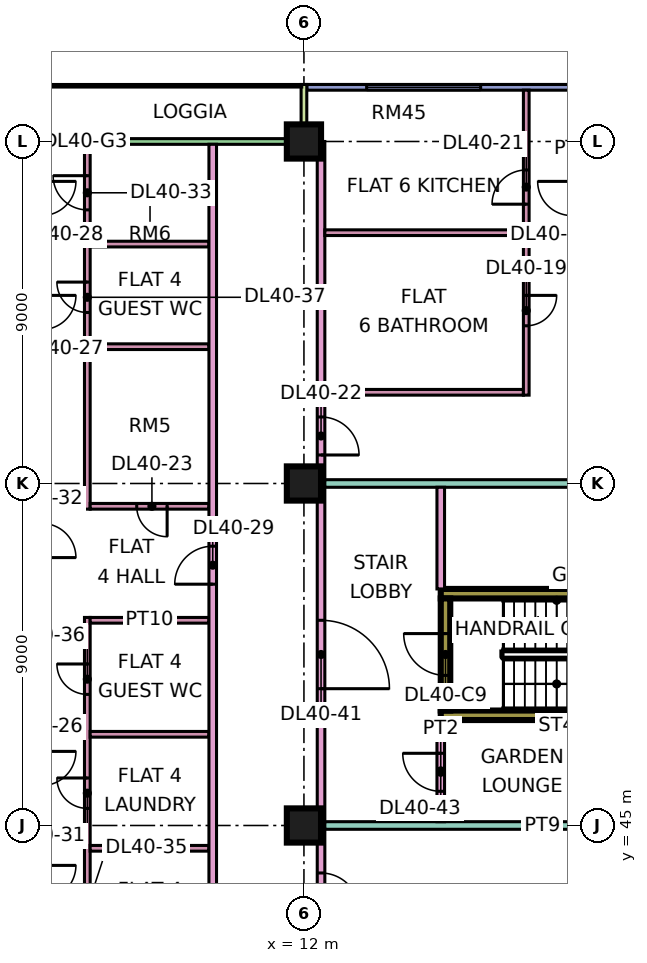
"""IFC4 building model, lengths in metres.
Left out: names, types, materials, properties, quantities, classifications, styles, units other than length and angle.
Written with IfcOpenShell. Run it as: python <this file> out.ifc"""

import sys

from ifc_helpers import new_model, si_unit, direction, frame, frame_2d, origin, origin_2d, place, context, subcontext, project, spatial, rectangle, extrude, element, fill, save


model = new_model("IFC4")
c1 = context("Model", 3, precision=1e-05, world=origin(), true_north=direction((0.0, 1.0)))
c2 = subcontext(c1, "Body", "Model", "MODEL_VIEW")
j1 = project(units=[si_unit("LENGTHUNIT", "METRE"), si_unit("PLANEANGLEUNIT", "RADIAN")], contexts=[c1])
p1 = place(None, origin())
s1 = spatial("IfcSite", under=j1, at=p1, CompositionType="ELEMENT")
p2 = place(p1, origin())
s2 = spatial("IfcBuilding", under=s1, at=p2, CompositionType="ELEMENT")
p3 = place(p2, frame((0.0, 0.0, 176.15)))
s3 = spatial("IfcBuildingStorey", under=s2, at=p3, CompositionType="ELEMENT", Elevation=176.15)
for number, where, z_axis, x_axis in (
    (1, (12.0, 45.0, 0.0), (0.0, 0.0, 1.0), (1.0, 0.0, 0.0)),
    (2, (12.0, 54.0, 0.0), (0.0, 0.0, 1.0), (1.0, 0.0, 0.0)),
    (3, (12.0, 63.0, 0.0), (0.0, 0.0, 1.0), (1.0, 0.0, 0.0)),
):
    element("IfcColumn", number, at=place(p3, frame(where, z_axis=z_axis, x_axis=x_axis)), inside=s3, PredefinedType="COLUMN", context=c2, shape_type="SweptSolid", body=[
        extrude(rectangle(XDim=0.9, YDim=0.9, at=origin_2d()), origin(), (0.0, 0.0, 1.0), 3.75),
    ])
for number, where, z_axis, x_axis in (
    (4, (15.6, 47.9, 0.0), (0.0, 0.0, 1.0), (1.0, 0.0, 0.0)),
    (5, (15.6, 51.1, 0.0), (0.0, 0.0, 1.0), (1.0, 0.0, 0.0)),
):
    element("IfcWall", number, at=place(p3, frame(where, z_axis=z_axis, x_axis=x_axis)), inside=s3, PredefinedType="SHEAR", context=c2, shape_type="SweptSolid", body=[
        extrude(rectangle(XDim=7.0, YDim=0.25, at=frame_2d((3.5, 0.0))), origin(), (0.0, 0.0, 1.0), 3.75),
    ])
p4 = place(p3, frame((15.725, 48.025, 0.0), z_axis=(0.0, 0.0, 1.0), x_axis=(0.0, 1.0, 0.0)))
e6 = element("IfcWall", 6, at=p4, inside=s3, PredefinedType="SHEAR", context=c2, shape_type="SweptSolid", body=[
    extrude(rectangle(XDim=2.95, YDim=0.25, at=frame_2d((1.475, 0.0))), origin(), (0.0, 0.0, 1.0), 3.75),
])
p5 = place(p4, frame((0.925, 0.0, 0.0)))
e7 = element("IfcOpeningElement", 7, at=p5, cuts=e6, PredefinedType="OPENING", context=c2, shape_type="SweptSolid", body=[
    extrude(rectangle(XDim=1.1, YDim=2.2, at=frame_2d((0.55, 1.1))), frame((0.0, 0.135, 0.0), z_axis=(0.0, -1.0, 0.0), x_axis=(1.0, 0.0, 0.0)), (0.0, 0.0, 1.0), 0.27),
])
p6 = place(p3, frame((22.5, 64.425, 0.0), z_axis=(0.0, 0.0, 1.0), x_axis=(-1.0, 0.0, 0.0)))
e8 = element("IfcWall", 8, at=p6, inside=s3, PredefinedType="SOLIDWALL", context=c2, shape_type="SweptSolid", body=[
    extrude(rectangle(XDim=10.425, YDim=0.15, at=frame_2d((5.212, 0.0))), origin(), (0.0, 0.0, 1.0), 3.35),
])
p7 = place(p6, frame((0.525, 0.0, 0.45)))
e9 = element("IfcOpeningElement", 9, at=p7, cuts=e8, PredefinedType="OPENING", context=c2, shape_type="SweptSolid", body=[
    extrude(rectangle(XDim=2.4, YDim=2.4, at=frame_2d((1.2, 1.2))), frame((0.0, 0.085, 0.0), z_axis=(0.0, -1.0, 0.0), x_axis=(1.0, 0.0, 0.0)), (0.0, 0.0, 1.0), 0.17),
])
p8 = place(p6, frame((5.85, 0.0, 0.45)))
e10 = element("IfcOpeningElement", 10, at=p8, cuts=e8, PredefinedType="OPENING", context=c2, shape_type="SweptSolid", body=[
    extrude(rectangle(XDim=3.0, YDim=2.4, at=frame_2d((1.5, 1.2))), frame((0.0, 0.085, 0.0), z_axis=(0.0, -1.0, 0.0), x_axis=(1.0, 0.0, 0.0)), (0.0, 0.0, 1.0), 0.17),
])
p9 = place(p3, frame((11.925, 63.0, 0.0), z_axis=(0.0, 0.0, 1.0), x_axis=(-1.0, 0.0, 0.0)))
e11 = element("IfcWall", 11, at=p9, inside=s3, PredefinedType="SOLIDWALL", context=c2, shape_type="SweptSolid", body=[
    extrude(rectangle(XDim=10.35, YDim=0.15, at=frame_2d((5.175, 0.0))), origin(), (0.0, 0.0, 1.0), 3.35),
])
p10 = place(p9, frame((7.688, 0.0, 0.0)))
e12 = element("IfcOpeningElement", 12, at=p10, cuts=e11, PredefinedType="OPENING", context=c2, shape_type="SweptSolid", body=[
    extrude(rectangle(XDim=1.8, YDim=2.4, at=frame_2d((0.9, 1.2))), frame((0.0, 0.085, 0.0), z_axis=(0.0, -1.0, 0.0), x_axis=(1.0, 0.0, 0.0)), (0.0, 0.0, 1.0), 0.17),
])
p11 = place(p3, frame((12.0, 64.5, 0.0), z_axis=(0.0, 0.0, 1.0), x_axis=(0.0, -1.0, 0.0)))
e13 = element("IfcWall", 13, at=p11, inside=s3, PredefinedType="SOLIDWALL", context=c2, shape_type="SweptSolid", body=[
    extrude(rectangle(XDim=1.5, YDim=0.15, at=frame_2d((0.75, 0.0))), origin(), (0.0, 0.0, 1.0), 3.35),
])
p12 = place(p3, frame((6.3, 36.1, 0.0), z_axis=(0.0, 0.0, 1.0), x_axis=(0.0, 1.0, 0.0)))
e14 = element("IfcWall", 14, at=p12, inside=s3, PredefinedType="PARTITIONING", context=c2, shape_type="SweptSolid", body=[
    extrude(rectangle(XDim=14.375, YDim=0.15, at=frame_2d((7.188, 0.0))), origin(), (0.0, 0.0, 1.0), 3.35),
])
p13 = place(p12, frame((2.15, 0.0, 0.0)))
e15 = element("IfcOpeningElement", 15, at=p13, cuts=e14, PredefinedType="OPENING", context=c2, shape_type="SweptSolid", body=[
    extrude(rectangle(XDim=0.9, YDim=2.1, at=frame_2d((0.45, 1.05))), frame((0.0, 0.085, 0.0), z_axis=(0.0, -1.0, 0.0), x_axis=(1.0, 0.0, 0.0)), (0.0, 0.0, 1.0), 0.17),
])
p14 = place(p12, frame((9.35, 0.0, 0.0)))
e16 = element("IfcOpeningElement", 16, at=p14, cuts=e14, PredefinedType="OPENING", context=c2, shape_type="SweptSolid", body=[
    extrude(rectangle(XDim=0.8, YDim=2.1, at=frame_2d((0.4, 1.05))), frame((0.0, 0.085, 0.0), z_axis=(0.0, -1.0, 0.0), x_axis=(1.0, 0.0, 0.0)), (0.0, 0.0, 1.0), 0.17),
])
p15 = place(p12, frame((6.35, 0.0, 0.0)))
e17 = element("IfcOpeningElement", 17, at=p15, cuts=e14, PredefinedType="OPENING", context=c2, shape_type="SweptSolid", body=[
    extrude(rectangle(XDim=0.8, YDim=2.1, at=frame_2d((0.4, 1.05))), frame((0.0, 0.085, 0.0), z_axis=(0.0, -1.0, 0.0), x_axis=(1.0, 0.0, 0.0)), (0.0, 0.0, 1.0), 0.17),
])
p16 = place(p12, frame((12.35, 0.0, 0.0)))
e18 = element("IfcOpeningElement", 18, at=p16, cuts=e14, PredefinedType="OPENING", context=c2, shape_type="SweptSolid", body=[
    extrude(rectangle(XDim=0.8, YDim=2.1, at=frame_2d((0.4, 1.05))), frame((0.0, 0.085, 0.0), z_axis=(0.0, -1.0, 0.0), x_axis=(1.0, 0.0, 0.0)), (0.0, 0.0, 1.0), 0.17),
])
p17 = place(p3, frame((6.3, 53.325, 0.0), z_axis=(0.0, 0.0, 1.0), x_axis=(0.0, 1.0, 0.0)))
e19 = element("IfcWall", 19, at=p17, inside=s3, PredefinedType="PARTITIONING", context=c2, shape_type="SweptSolid", body=[
    extrude(rectangle(XDim=9.601, YDim=0.15, at=frame_2d((4.801, 0.0))), origin(), (0.0, 0.0, 1.0), 3.35),
])
p18 = place(p17, frame((7.875, 0.0, 0.0)))
e20 = element("IfcOpeningElement", 20, at=p18, cuts=e19, PredefinedType="OPENING", context=c2, shape_type="SweptSolid", body=[
    extrude(rectangle(XDim=0.9, YDim=2.1, at=frame_2d((0.45, 1.05))), frame((0.0, 0.085, 0.0), z_axis=(0.0, -1.0, 0.0), x_axis=(1.0, 0.0, 0.0)), (0.0, 0.0, 1.0), 0.17),
])
p19 = place(p17, frame((5.175, 0.0, 0.0)))
e21 = element("IfcOpeningElement", 21, at=p19, cuts=e19, PredefinedType="OPENING", context=c2, shape_type="SweptSolid", body=[
    extrude(rectangle(XDim=0.8, YDim=2.1, at=frame_2d((0.4, 1.05))), frame((0.0, 0.085, 0.0), z_axis=(0.0, -1.0, 0.0), x_axis=(1.0, 0.0, 0.0)), (0.0, 0.0, 1.0), 0.17),
])
for number, where, z_axis, x_axis in (
    (22, (6.375, 44.4, 0.0), (0.0, 0.0, 1.0), (1.0, 0.0, 0.0)),
    (23, (6.375, 47.4, 0.0), (0.0, 0.0, 1.0), (1.0, 0.0, 0.0)),
    (24, (6.375, 50.4, 0.0), (0.0, 0.0, 1.0), (1.0, 0.0, 0.0)),
):
    element("IfcWall", number, at=place(p3, frame(where, z_axis=z_axis, x_axis=x_axis)), inside=s3, PredefinedType="PARTITIONING", context=c2, shape_type="SweptSolid", body=[
        extrude(rectangle(XDim=3.125, YDim=0.15, at=frame_2d((1.562, 0.0))), origin(), (0.0, 0.0, 1.0), 3.35),
    ])
p20 = place(p3, frame((6.375, 53.4, 0.0), z_axis=(0.0, 0.0, 1.0), x_axis=(1.0, 0.0, 0.0)))
e25 = element("IfcWall", 25, at=p20, inside=s3, PredefinedType="PARTITIONING", context=c2, shape_type="SweptSolid", body=[
    extrude(rectangle(XDim=3.125, YDim=0.15, at=frame_2d((1.562, 0.0))), origin(), (0.0, 0.0, 1.0), 3.35),
])
p21 = place(p20, frame((1.225, 0.0, 0.0)))
e26 = element("IfcOpeningElement", 26, at=p21, cuts=e25, PredefinedType="OPENING", context=c2, shape_type="SweptSolid", body=[
    extrude(rectangle(XDim=0.8, YDim=2.1, at=frame_2d((0.4, 1.05))), frame((0.0, 0.085, 0.0), z_axis=(0.0, -1.0, 0.0), x_axis=(1.0, 0.0, 0.0)), (0.0, 0.0, 1.0), 0.17),
])
for number, where, z_axis, x_axis in (
    (27, (6.375, 57.6, 0.0), (0.0, 0.0, 1.0), (1.0, 0.0, 0.0)),
    (28, (6.375, 60.3, 0.0), (0.0, 0.0, 1.0), (1.0, 0.0, 0.0)),
):
    element("IfcWall", number, at=place(p3, frame(where, z_axis=z_axis, x_axis=x_axis)), inside=s3, PredefinedType="PARTITIONING", context=c2, shape_type="SweptSolid", body=[
        extrude(rectangle(XDim=3.125, YDim=0.15, at=frame_2d((1.562, 0.0))), origin(), (0.0, 0.0, 1.0), 3.35),
    ])
p22 = place(p3, frame((9.6, 20.0, 0.0), z_axis=(0.0, 0.0, 1.0), x_axis=(0.0, 1.0, 0.0)))
e29 = element("IfcWall", 29, at=p22, inside=s3, PredefinedType="PARTITIONING", context=c2, shape_type="SweptSolid", body=[
    extrude(rectangle(XDim=42.926, YDim=0.2, at=frame_2d((21.463, 0.0))), origin(), (0.0, 0.0, 1.0), 3.35),
])
p23 = place(p22, frame((31.35, 0.0, 0.0)))
e30 = element("IfcOpeningElement", 30, at=p23, cuts=e29, PredefinedType="OPENING", context=c2, shape_type="SweptSolid", body=[
    extrude(rectangle(XDim=1.0, YDim=2.1, at=frame_2d((0.5, 1.05))), frame((0.0, 0.11, 0.0), z_axis=(0.0, -1.0, 0.0), x_axis=(1.0, 0.0, 0.0)), (0.0, 0.0, 1.0), 0.22),
])
p24 = place(p22, frame((0.6, 0.0, 0.0)))
e31 = element("IfcOpeningElement", 31, at=p24, cuts=e29, PredefinedType="OPENING", context=c2, shape_type="SweptSolid", body=[
    extrude(rectangle(XDim=1.2, YDim=2.1, at=frame_2d((0.6, 1.05))), frame((0.0, 0.11, 0.0), z_axis=(0.0, -1.0, 0.0), x_axis=(1.0, 0.0, 0.0)), (0.0, 0.0, 1.0), 0.22),
])
p25 = place(p22, frame((3.9, 0.0, 0.0)))
e32 = element("IfcOpeningElement", 32, at=p25, cuts=e29, PredefinedType="OPENING", context=c2, shape_type="SweptSolid", body=[
    extrude(rectangle(XDim=1.0, YDim=2.1, at=frame_2d((0.5, 1.05))), frame((0.0, 0.11, 0.0), z_axis=(0.0, -1.0, 0.0), x_axis=(1.0, 0.0, 0.0)), (0.0, 0.0, 1.0), 0.22),
])
p26 = place(p3, frame((12.45, 20.0, 0.0), z_axis=(0.0, 0.0, 1.0), x_axis=(0.0, 1.0, 0.0)))
e33 = element("IfcWall", 33, at=p26, inside=s3, PredefinedType="PARTITIONING", context=c2, shape_type="SweptSolid", body=[
    extrude(rectangle(XDim=43.0, YDim=0.2, at=frame_2d((21.5, 0.0))), origin(), (0.0, 0.0, 1.0), 3.35),
])
p27 = place(p26, frame((5.95, 0.0, 0.0)))
e34 = element("IfcOpeningElement", 34, at=p27, cuts=e33, PredefinedType="OPENING", context=c2, shape_type="SweptSolid", body=[
    extrude(rectangle(XDim=1.0, YDim=2.1, at=frame_2d((0.5, 1.05))), frame((0.0, 0.11, 0.0), z_axis=(0.0, -1.0, 0.0), x_axis=(1.0, 0.0, 0.0)), (0.0, 0.0, 1.0), 0.22),
])
p28 = place(p26, frame((12.0, 0.0, 0.0)))
e35 = element("IfcOpeningElement", 35, at=p28, cuts=e33, PredefinedType="OPENING", context=c2, shape_type="SweptSolid", body=[
    extrude(rectangle(XDim=1.0, YDim=2.1, at=frame_2d((0.5, 1.05))), frame((0.0, 0.11, 0.0), z_axis=(0.0, -1.0, 0.0), x_axis=(1.0, 0.0, 0.0)), (0.0, 0.0, 1.0), 0.22),
])
p29 = place(p26, frame((22.75, 0.0, 0.0)))
e36 = element("IfcOpeningElement", 36, at=p29, cuts=e33, PredefinedType="OPENING", context=c2, shape_type="SweptSolid", body=[
    extrude(rectangle(XDim=1.0, YDim=2.1, at=frame_2d((0.5, 1.05))), frame((0.0, 0.11, 0.0), z_axis=(0.0, -1.0, 0.0), x_axis=(1.0, 0.0, 0.0)), (0.0, 0.0, 1.0), 0.22),
])
p30 = place(p26, frame((34.75, 0.0, 0.0)))
e37 = element("IfcOpeningElement", 37, at=p30, cuts=e33, PredefinedType="OPENING", context=c2, shape_type="SweptSolid", body=[
    extrude(rectangle(XDim=1.0, YDim=2.1, at=frame_2d((0.5, 1.05))), frame((0.0, 0.11, 0.0), z_axis=(0.0, -1.0, 0.0), x_axis=(1.0, 0.0, 0.0)), (0.0, 0.0, 1.0), 0.22),
])
p31 = place(p26, frame((1.15, 0.0, 0.0)))
e38 = element("IfcOpeningElement", 38, at=p31, cuts=e33, PredefinedType="OPENING", context=c2, shape_type="SweptSolid", body=[
    extrude(rectangle(XDim=1.8, YDim=2.1, at=frame_2d((0.9, 1.05))), frame((0.0, 0.11, 0.0), z_axis=(0.0, -1.0, 0.0), x_axis=(1.0, 0.0, 0.0)), (0.0, 0.0, 1.0), 0.22),
])
p32 = place(p26, frame((28.6, 0.0, 0.0)))
e39 = element("IfcOpeningElement", 39, at=p32, cuts=e33, PredefinedType="OPENING", context=c2, shape_type="SweptSolid", body=[
    extrude(rectangle(XDim=1.8, YDim=2.1, at=frame_2d((0.9, 1.05))), frame((0.0, 0.11, 0.0), z_axis=(0.0, -1.0, 0.0), x_axis=(1.0, 0.0, 0.0)), (0.0, 0.0, 1.0), 0.22),
])
p33 = place(p3, frame((12.55, 45.0, 0.0), z_axis=(0.0, 0.0, 1.0), x_axis=(1.0, 0.0, 0.0)))
e40 = element("IfcWall", 40, at=p33, inside=s3, PredefinedType="PARTITIONING", context=c2, shape_type="SweptSolid", body=[
    extrude(rectangle(XDim=11.45, YDim=0.2, at=frame_2d((5.725, 0.0))), origin(), (0.0, 0.0, 1.0), 3.35),
])
p34 = place(p3, frame((12.55, 54.0, 0.0), z_axis=(0.0, 0.0, 1.0), x_axis=(1.0, 0.0, 0.0)))
e41 = element("IfcWall", 41, at=p34, inside=s3, PredefinedType="PARTITIONING", context=c2, shape_type="SweptSolid", body=[
    extrude(rectangle(XDim=11.376, YDim=0.2, at=frame_2d((5.688, 0.0))), origin(), (0.0, 0.0, 1.0), 3.35),
])
for number, where, z_axis, x_axis in (
    (42, (12.55, 56.4, 0.0), (0.0, 0.0, 1.0), (1.0, 0.0, 0.0)),
    (43, (12.55, 60.6, 0.0), (0.0, 0.0, 1.0), (1.0, 0.0, 0.0)),
):
    element("IfcWall", number, at=place(p3, frame(where, z_axis=z_axis, x_axis=x_axis)), inside=s3, PredefinedType="PARTITIONING", context=c2, shape_type="SweptSolid", body=[
        extrude(rectangle(XDim=5.225, YDim=0.15, at=frame_2d((2.612, 0.0))), origin(), (0.0, 0.0, 1.0), 3.35),
    ])
p35 = place(p3, frame((15.6, 45.1, 0.0), z_axis=(0.0, 0.0, 1.0), x_axis=(0.0, 1.0, 0.0)))
e44 = element("IfcWall", 44, at=p35, inside=s3, PredefinedType="PARTITIONING", context=c2, shape_type="SweptSolid", body=[
    extrude(rectangle(XDim=2.675, YDim=0.2, at=frame_2d((1.337, 0.0))), origin(), (0.0, 0.0, 1.0), 3.35),
])
p36 = place(p35, frame((0.8, 0.0, 0.0)))
e45 = element("IfcOpeningElement", 45, at=p36, cuts=e44, PredefinedType="OPENING", context=c2, shape_type="SweptSolid", body=[
    extrude(rectangle(XDim=1.0, YDim=2.1, at=frame_2d((0.5, 1.05))), frame((0.0, 0.11, 0.0), z_axis=(0.0, -1.0, 0.0), x_axis=(1.0, 0.0, 0.0)), (0.0, 0.0, 1.0), 0.22),
])
p37 = place(p3, frame((15.6, 51.225, 0.0), z_axis=(0.0, 0.0, 1.0), x_axis=(0.0, 1.0, 0.0)))
e46 = element("IfcWall", 46, at=p37, inside=s3, PredefinedType="PARTITIONING", context=c2, shape_type="SweptSolid", body=[
    extrude(rectangle(XDim=2.675, YDim=0.2, at=frame_2d((1.337, 0.0))), origin(), (0.0, 0.0, 1.0), 3.35),
])
p38 = place(p3, frame((17.85, 56.325, 0.0), z_axis=(0.0, 0.0, 1.0), x_axis=(0.0, 1.0, 0.0)))
e47 = element("IfcWall", 47, at=p38, inside=s3, PredefinedType="PARTITIONING", context=c2, shape_type="SweptSolid", body=[
    extrude(rectangle(XDim=8.025, YDim=0.15, at=frame_2d((4.013, 0.0))), origin(), (0.0, 0.0, 1.0), 3.35),
])
p39 = place(p38, frame((1.825, 0.0, 0.0)))
e48 = element("IfcOpeningElement", 48, at=p39, cuts=e47, PredefinedType="OPENING", context=c2, shape_type="SweptSolid", body=[
    extrude(rectangle(XDim=0.8, YDim=2.1, at=frame_2d((0.4, 1.05))), frame((0.0, 0.085, 0.0), z_axis=(0.0, -1.0, 0.0), x_axis=(1.0, 0.0, 0.0)), (0.0, 0.0, 1.0), 0.17),
])
p40 = place(p38, frame((5.025, 0.0, 0.0)))
e49 = element("IfcOpeningElement", 49, at=p40, cuts=e47, PredefinedType="OPENING", context=c2, shape_type="SweptSolid", body=[
    extrude(rectangle(XDim=0.9, YDim=2.1, at=frame_2d((0.45, 1.05))), frame((0.0, 0.085, 0.0), z_axis=(0.0, -1.0, 0.0), x_axis=(1.0, 0.0, 0.0)), (0.0, 0.0, 1.0), 0.17),
])
p41 = place(p8, origin())
e50 = element("IfcWindow", 50, at=p41, inside=s3, PartitioningType="SINGLE_PANEL", PredefinedType="WINDOW", context=c2, shape_type="SweptSolid", body=[
    extrude(rectangle(XDim=3.0, YDim=2.4, at=frame_2d((1.5, 1.2))), frame((0.0, 0.03, 0.0), z_axis=(0.0, -1.0, 0.0), x_axis=(1.0, 0.0, 0.0)), (0.0, 0.0, 1.0), 0.06),
])
fill(e10, e50)
p42 = place(p5, frame((1.1, 0.0, 0.0), z_axis=(0.0, 0.0, 1.0), x_axis=(-1.0, 0.0, 0.0)))
e51 = element("IfcDoor", 51, at=p42, inside=s3, OperationType="SINGLE_SWING_RIGHT", PredefinedType="DOOR", context=c2, shape_type="SweptSolid", body=[
    extrude(rectangle(XDim=1.1, YDim=2.2, at=frame_2d((0.55, 1.1))), frame((0.0, 0.025, 0.0), z_axis=(0.0, -1.0, 0.0), x_axis=(1.0, 0.0, 0.0)), (0.0, 0.0, 1.0), 0.05),
])
fill(e7, e51)
p43 = place(p29, frame((1.0, 0.0, 0.0), z_axis=(0.0, 0.0, 1.0), x_axis=(-1.0, 0.0, 0.0)))
e52 = element("IfcDoor", 52, at=p43, inside=s3, OperationType="SINGLE_SWING_LEFT", PredefinedType="DOOR", context=c2, shape_type="SweptSolid", body=[
    extrude(rectangle(XDim=1.0, YDim=2.1, at=frame_2d((0.5, 1.05))), frame((0.0, 0.025, 0.0), z_axis=(0.0, -1.0, 0.0), x_axis=(1.0, 0.0, 0.0)), (0.0, 0.0, 1.0), 0.05),
])
fill(e36, e52)
p44 = place(p39, origin())
e53 = element("IfcDoor", 53, at=p44, inside=s3, OperationType="SINGLE_SWING_RIGHT", PredefinedType="DOOR", context=c2, shape_type="SweptSolid", body=[
    extrude(rectangle(XDim=0.8, YDim=2.1, at=frame_2d((0.4, 1.05))), frame((0.0, 0.025, 0.0), z_axis=(0.0, -1.0, 0.0), x_axis=(1.0, 0.0, 0.0)), (0.0, 0.0, 1.0), 0.05),
])
fill(e48, e53)
p45 = place(p40, origin())
e54 = element("IfcDoor", 54, at=p45, inside=s3, OperationType="SINGLE_SWING_LEFT", PredefinedType="DOOR", context=c2, shape_type="SweptSolid", body=[
    extrude(rectangle(XDim=0.9, YDim=2.1, at=frame_2d((0.45, 1.05))), frame((0.0, 0.025, 0.0), z_axis=(0.0, -1.0, 0.0), x_axis=(1.0, 0.0, 0.0)), (0.0, 0.0, 1.0), 0.05),
])
fill(e49, e54)
p46 = place(p30, frame((1.0, 0.0, 0.0), z_axis=(0.0, 0.0, 1.0), x_axis=(-1.0, 0.0, 0.0)))
e55 = element("IfcDoor", 55, at=p46, inside=s3, OperationType="SINGLE_SWING_LEFT", PredefinedType="DOOR", context=c2, shape_type="SweptSolid", body=[
    extrude(rectangle(XDim=1.0, YDim=2.1, at=frame_2d((0.5, 1.05))), frame((0.0, 0.025, 0.0), z_axis=(0.0, -1.0, 0.0), x_axis=(1.0, 0.0, 0.0)), (0.0, 0.0, 1.0), 0.05),
])
fill(e37, e55)
p47 = place(p21, origin())
e56 = element("IfcDoor", 56, at=p47, inside=s3, OperationType="SINGLE_SWING_RIGHT", PredefinedType="DOOR", context=c2, shape_type="SweptSolid", body=[
    extrude(rectangle(XDim=0.8, YDim=2.1, at=frame_2d((0.4, 1.05))), frame((0.0, 0.025, 0.0), z_axis=(0.0, -1.0, 0.0), x_axis=(1.0, 0.0, 0.0)), (0.0, 0.0, 1.0), 0.05),
])
fill(e26, e56)
p48 = place(p23, origin())
e57 = element("IfcDoor", 57, at=p48, inside=s3, OperationType="SINGLE_SWING_LEFT", PredefinedType="DOOR", context=c2, shape_type="SweptSolid", body=[
    extrude(rectangle(XDim=1.0, YDim=2.1, at=frame_2d((0.5, 1.05))), frame((0.0, 0.025, 0.0), z_axis=(0.0, -1.0, 0.0), x_axis=(1.0, 0.0, 0.0)), (0.0, 0.0, 1.0), 0.05),
])
fill(e30, e57)
p49 = place(p14, frame((0.8, 0.0, 0.0), z_axis=(0.0, 0.0, 1.0), x_axis=(-1.0, 0.0, 0.0)))
e58 = element("IfcDoor", 58, at=p49, inside=s3, OperationType="SINGLE_SWING_RIGHT", PredefinedType="DOOR", context=c2, shape_type="SweptSolid", body=[
    extrude(rectangle(XDim=0.8, YDim=2.1, at=frame_2d((0.4, 1.05))), frame((0.0, 0.025, 0.0), z_axis=(0.0, -1.0, 0.0), x_axis=(1.0, 0.0, 0.0)), (0.0, 0.0, 1.0), 0.05),
])
fill(e16, e58)
p50 = place(p18, frame((0.9, 0.0, 0.0), z_axis=(0.0, 0.0, 1.0), x_axis=(-1.0, 0.0, 0.0)))
e59 = element("IfcDoor", 59, at=p50, inside=s3, OperationType="SINGLE_SWING_RIGHT", PredefinedType="DOOR", context=c2, shape_type="SweptSolid", body=[
    extrude(rectangle(XDim=0.9, YDim=2.1, at=frame_2d((0.45, 1.05))), frame((0.0, 0.025, 0.0), z_axis=(0.0, -1.0, 0.0), x_axis=(1.0, 0.0, 0.0)), (0.0, 0.0, 1.0), 0.05),
])
fill(e20, e59)
p51 = place(p16, frame((0.8, 0.0, 0.0), z_axis=(0.0, 0.0, 1.0), x_axis=(-1.0, 0.0, 0.0)))
e60 = element("IfcDoor", 60, at=p51, inside=s3, OperationType="SINGLE_SWING_RIGHT", PredefinedType="DOOR", context=c2, shape_type="SweptSolid", body=[
    extrude(rectangle(XDim=0.8, YDim=2.1, at=frame_2d((0.4, 1.05))), frame((0.0, 0.025, 0.0), z_axis=(0.0, -1.0, 0.0), x_axis=(1.0, 0.0, 0.0)), (0.0, 0.0, 1.0), 0.05),
])
fill(e18, e60)
p52 = place(p19, frame((0.8, 0.0, 0.0), z_axis=(0.0, 0.0, 1.0), x_axis=(-1.0, 0.0, 0.0)))
e61 = element("IfcDoor", 61, at=p52, inside=s3, OperationType="SINGLE_SWING_RIGHT", PredefinedType="DOOR", context=c2, shape_type="SweptSolid", body=[
    extrude(rectangle(XDim=0.8, YDim=2.1, at=frame_2d((0.4, 1.05))), frame((0.0, 0.025, 0.0), z_axis=(0.0, -1.0, 0.0), x_axis=(1.0, 0.0, 0.0)), (0.0, 0.0, 1.0), 0.05),
])
fill(e21, e61)
p53 = place(p32, frame((1.8, 0.0, 0.0), z_axis=(0.0, 0.0, 1.0), x_axis=(-1.0, 0.0, 0.0)))
e62 = element("IfcDoor", 62, at=p53, inside=s3, OperationType="DOUBLE_DOOR_SINGLE_SWING", PredefinedType="DOOR", context=c2, shape_type="SweptSolid", body=[
    extrude(rectangle(XDim=1.8, YDim=2.1, at=frame_2d((0.9, 1.05))), frame((0.0, 0.025, 0.0), z_axis=(0.0, -1.0, 0.0), x_axis=(1.0, 0.0, 0.0)), (0.0, 0.0, 1.0), 0.05),
])
fill(e39, e62)
p54 = place(p36, frame((1.0, 0.0, 0.0), z_axis=(0.0, 0.0, 1.0), x_axis=(-1.0, 0.0, 0.0)))
e63 = element("IfcDoor", 63, at=p54, inside=s3, OperationType="SINGLE_SWING_RIGHT", PredefinedType="DOOR", context=c2, shape_type="SweptSolid", body=[
    extrude(rectangle(XDim=1.0, YDim=2.1, at=frame_2d((0.5, 1.05))), frame((0.0, 0.025, 0.0), z_axis=(0.0, -1.0, 0.0), x_axis=(1.0, 0.0, 0.0)), (0.0, 0.0, 1.0), 0.05),
])
fill(e45, e63)
save(model, sys.argv[1])
